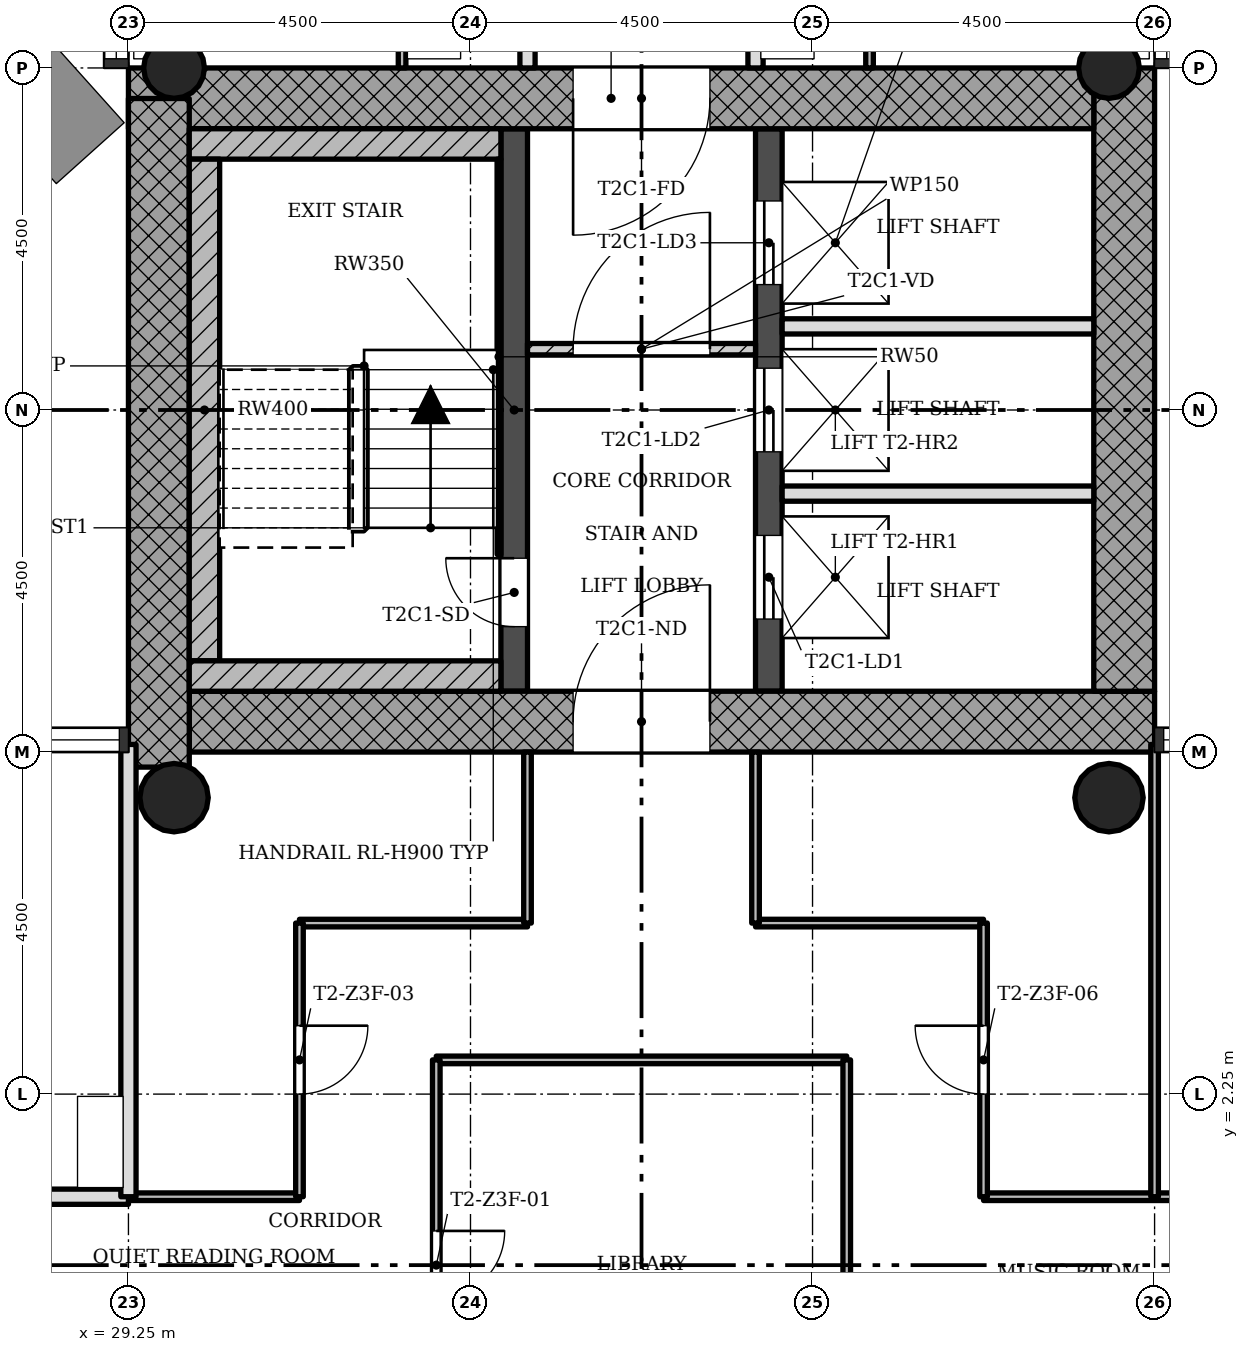
"""IFC4 building model, lengths in metres.
Left out: names, types, materials, properties, quantities, classifications, styles, units other than length and angle.
Written with IfcOpenShell. Run it as: python <this file> out.ifc"""

import sys

from ifc_helpers import new_model, si_unit, direction, frame, frame_2d, origin, origin_2d, place, context, subcontext, project, spatial, rectangle, hollow_circle, extrude, element, fill, save


model = new_model("IFC4")
c1 = context("Model", 3, precision=1e-05, world=origin(), true_north=direction((0.0, 1.0)))
c2 = subcontext(c1, "Body", "Model", "MODEL_VIEW")
j1 = project(units=[si_unit("LENGTHUNIT", "METRE"), si_unit("PLANEANGLEUNIT", "RADIAN")], contexts=[c1])
p1 = place(None, origin())
s1 = spatial("IfcSite", under=j1, at=p1, CompositionType="ELEMENT")
p2 = place(p1, origin())
s2 = spatial("IfcBuilding", under=s1, at=p2, CompositionType="ELEMENT")
p3 = place(p2, frame((0.0, 0.0, 164.3)))
s3 = spatial("IfcBuildingStorey", under=s2, at=p3, CompositionType="ELEMENT", Elevation=164.3)
p4 = place(p3, frame((30.05, 7.15, 0.0), z_axis=(0.0, 0.0, 1.0), x_axis=(1.0, 0.0, 0.0)))
e1 = element("IfcWall", 1, at=p4, inside=s3, PredefinedType="SHEAR", context=c2, shape_type="SweptSolid", body=[
    extrude(rectangle(XDim=12.7, YDim=0.8, at=frame_2d((6.35, 0.0))), origin(), (0.0, 0.0, 1.0), 3.4),
])
p5 = place(p4, frame((5.05, 0.0, 0.0)))
e2 = element("IfcOpeningElement", 2, at=p5, cuts=e1, PredefinedType="OPENING", context=c2, shape_type="SweptSolid", body=[
    extrude(rectangle(XDim=1.8, YDim=2.1, at=frame_2d((0.9, 1.05))), frame((0.0, 0.41, 0.0), z_axis=(0.0, -1.0, 0.0), x_axis=(1.0, 0.0, 0.0)), (0.0, 0.0, 1.0), 0.82),
])
p6 = place(p3, frame((42.35, 7.55, 0.0), z_axis=(0.0, 0.0, 1.0), x_axis=(0.0, 1.0, 0.0)))
e3 = element("IfcWall", 3, at=p6, inside=s3, PredefinedType="SHEAR", context=c2, shape_type="SweptSolid", body=[
    extrude(rectangle(XDim=8.2, YDim=0.8, at=frame_2d((4.1, 0.0))), origin(), (0.0, 0.0, 1.0), 3.4),
])
p7 = place(p3, frame((41.95, 15.35, 0.0), z_axis=(0.0, 0.0, 1.0), x_axis=(-1.0, 0.0, 0.0)))
e4 = element("IfcWall", 4, at=p7, inside=s3, PredefinedType="SHEAR", context=c2, shape_type="SweptSolid", body=[
    extrude(rectangle(XDim=12.7, YDim=0.8, at=frame_2d((6.35, 0.0))), origin(), (0.0, 0.0, 1.0), 3.4),
])
p8 = place(p7, frame((5.05, 0.0, 0.0)))
e5 = element("IfcOpeningElement", 5, at=p8, cuts=e4, PredefinedType="OPENING", context=c2, shape_type="SweptSolid", body=[
    extrude(rectangle(XDim=1.8, YDim=2.1, at=frame_2d((0.9, 1.05))), frame((0.0, 0.41, 0.0), z_axis=(0.0, -1.0, 0.0), x_axis=(1.0, 0.0, 0.0)), (0.0, 0.0, 1.0), 0.82),
])
p9 = place(p3, frame((29.65, 15.348, 0.0), z_axis=(0.0, 0.0, 1.0), x_axis=(0.0, -1.0, 0.0)))
e6 = element("IfcWall", 6, at=p9, inside=s3, PredefinedType="SHEAR", context=c2, shape_type="SweptSolid", body=[
    extrude(rectangle(XDim=8.796, YDim=0.8, at=frame_2d((4.398, 0.0))), origin(), (0.0, 0.0, 1.0), 3.4),
])
p10 = place(p3, frame((34.325, 7.55, 0.0), z_axis=(0.0, 0.0, 1.0), x_axis=(0.0, 1.0, 0.0)))
e7 = element("IfcWall", 7, at=p10, inside=s3, PredefinedType="SHEAR", context=c2, shape_type="SweptSolid", body=[
    extrude(rectangle(XDim=7.4, YDim=0.35, at=frame_2d((3.7, 0.0))), origin(), (0.0, 0.0, 1.0), 3.4),
])
p11 = place(p10, frame((0.85, 0.0, 0.0)))
e8 = element("IfcOpeningElement", 8, at=p11, cuts=e7, PredefinedType="OPENING", context=c2, shape_type="SweptSolid", body=[
    extrude(rectangle(XDim=0.9, YDim=2.1, at=frame_2d((0.45, 1.05))), frame((0.0, 0.185, 0.0), z_axis=(0.0, -1.0, 0.0), x_axis=(1.0, 0.0, 0.0)), (0.0, 0.0, 1.0), 0.37),
])
p12 = place(p3, frame((37.675, 7.55, 0.0), z_axis=(0.0, 0.0, 1.0), x_axis=(0.0, 1.0, 0.0)))
e9 = element("IfcWall", 9, at=p12, inside=s3, PredefinedType="SHEAR", context=c2, shape_type="SweptSolid", body=[
    extrude(rectangle(XDim=7.4, YDim=0.35, at=frame_2d((3.7, 0.0))), origin(), (0.0, 0.0, 1.0), 3.4),
])
p13 = place(p12, frame((0.95, 0.0, 0.0)))
e10 = element("IfcOpeningElement", 10, at=p13, cuts=e9, PredefinedType="OPENING", context=c2, shape_type="SweptSolid", body=[
    extrude(rectangle(XDim=1.1, YDim=2.1, at=frame_2d((0.55, 1.05))), frame((0.0, 0.185, 0.0), z_axis=(0.0, -1.0, 0.0), x_axis=(1.0, 0.0, 0.0)), (0.0, 0.0, 1.0), 0.37),
])
p14 = place(p12, frame((3.15, 0.0, 0.0)))
e11 = element("IfcOpeningElement", 11, at=p14, cuts=e9, PredefinedType="OPENING", context=c2, shape_type="SweptSolid", body=[
    extrude(rectangle(XDim=1.1, YDim=2.1, at=frame_2d((0.55, 1.05))), frame((0.0, 0.185, 0.0), z_axis=(0.0, -1.0, 0.0), x_axis=(1.0, 0.0, 0.0)), (0.0, 0.0, 1.0), 0.37),
])
p15 = place(p12, frame((5.35, 0.0, 0.0)))
e12 = element("IfcOpeningElement", 12, at=p15, cuts=e9, PredefinedType="OPENING", context=c2, shape_type="SweptSolid", body=[
    extrude(rectangle(XDim=1.1, YDim=2.1, at=frame_2d((0.55, 1.05))), frame((0.0, 0.185, 0.0), z_axis=(0.0, -1.0, 0.0), x_axis=(1.0, 0.0, 0.0)), (0.0, 0.0, 1.0), 0.37),
])
for number, where, z_axis, x_axis in (
    (13, (42.15, 15.75, 0.0), (0.0, 0.0, 1.0), (1.0, 0.0, 0.0)),
    (14, (29.85, 15.75, 0.0), (0.0, 0.0, 1.0), (1.0, 0.0, 0.0)),
):
    element("IfcColumn", number, at=place(p3, frame(where, z_axis=z_axis, x_axis=x_axis)), inside=s3, PredefinedType="COLUMN", context=c2, shape_type="SweptSolid", body=[
        extrude(hollow_circle(Radius=0.4, WallThickness=0.028, at=origin_2d()), origin(), (0.0, 0.0, 1.0), 3.4),
    ])
for number, where, z_axis, x_axis in (
    (15, (42.15, 6.15, 0.0), (0.0, 0.0, 1.0), (1.0, 0.0, 0.0)),
    (16, (29.85, 6.15, 0.0), (0.0, 0.0, 1.0), (1.0, 0.0, 0.0)),
):
    element("IfcColumn", number, at=place(p3, frame(where, z_axis=z_axis, x_axis=x_axis)), inside=s3, PredefinedType="COLUMN", context=c2, shape_type="SweptSolid", body=[
        extrude(hollow_circle(Radius=0.45, WallThickness=0.032, at=origin_2d()), origin(), (0.0, 0.0, 1.0), 3.4),
    ])
p16 = place(p3, frame((37.5, 12.05, 0.0), z_axis=(0.0, 0.0, 1.0), x_axis=(-1.0, 0.0, 0.0)))
e17 = element("IfcWall", 17, at=p16, inside=s3, PredefinedType="PARTITIONING", context=c2, shape_type="SweptSolid", body=[
    extrude(rectangle(XDim=3.0, YDim=0.15, at=frame_2d((1.5, 0.0))), origin(), (0.0, 0.0, 1.0), 3.0),
])
p17 = place(p16, frame((0.6, 0.0, 0.0)))
e18 = element("IfcOpeningElement", 18, at=p17, cuts=e17, PredefinedType="OPENING", context=c2, shape_type="SweptSolid", body=[
    extrude(rectangle(XDim=1.8, YDim=2.1, at=frame_2d((0.9, 1.05))), frame((0.0, 0.085, 0.0), z_axis=(0.0, -1.0, 0.0), x_axis=(1.0, 0.0, 0.0)), (0.0, 0.0, 1.0), 0.17),
])
for number, where, z_axis, x_axis in (
    (19, (41.95, 10.15, 0.0), (0.0, 0.0, 1.0), (-1.0, 0.0, 0.0)),
    (20, (41.95, 12.35, 0.0), (0.0, 0.0, 1.0), (-1.0, 0.0, 0.0)),
):
    element("IfcWall", number, at=place(p3, frame(where, z_axis=z_axis, x_axis=x_axis)), inside=s3, PredefinedType="SOLIDWALL", context=c2, shape_type="SweptSolid", body=[
        extrude(rectangle(XDim=4.1, YDim=0.2, at=frame_2d((2.05, 0.0))), origin(), (0.0, 0.0, 1.0), 3.0),
    ])
p18 = place(p3, frame((44.55, 0.9, 0.0), z_axis=(0.0, 0.0, 1.0), x_axis=(-1.0, 0.0, 0.0)))
e21 = element("IfcWall", 21, at=p18, inside=s3, PredefinedType="PARTITIONING", context=c2, shape_type="SweptSolid", body=[
    extrude(rectangle(XDim=4.05, YDim=0.1, at=frame_2d((2.025, 0.0))), origin(), (0.0, 0.0, 1.0), 3.0),
])
p19 = place(p3, frame((31.5, 0.9, 0.0), z_axis=(0.0, 0.0, 1.0), x_axis=(-1.0, 0.0, 0.0)))
e22 = element("IfcWall", 22, at=p19, inside=s3, PredefinedType="PARTITIONING", context=c2, shape_type="SweptSolid", body=[
    extrude(rectangle(XDim=2.25, YDim=0.1, at=frame_2d((1.125, 0.0))), origin(), (0.0, 0.0, 1.0), 3.0),
])
p20 = place(p3, frame((29.25, 0.9, 0.0), z_axis=(0.0, 0.0, 1.0), x_axis=(-1.0, 0.0, 0.0)))
e23 = element("IfcWall", 23, at=p20, inside=s3, PredefinedType="SOLIDWALL", context=c2, shape_type="SweptSolid", body=[
    extrude(rectangle(XDim=9.0, YDim=0.2, at=frame_2d((4.5, 0.0))), origin(), (0.0, 0.0, 1.0), 3.0),
])
p21 = place(p20, frame((6.15, 0.0, 0.0)))
e24 = element("IfcOpeningElement", 24, at=p21, cuts=e23, PredefinedType="OPENING", context=c2, shape_type="SweptSolid", body=[
    extrude(rectangle(XDim=0.9, YDim=2.1, at=frame_2d((0.45, 1.05))), frame((0.0, 0.11, 0.0), z_axis=(0.0, -1.0, 0.0), x_axis=(1.0, 0.0, 0.0)), (0.0, 0.0, 1.0), 0.22),
])
p22 = place(p3, frame((38.7, 2.7, 0.0), z_axis=(0.0, 0.0, 1.0), x_axis=(-1.0, 0.0, 0.0)))
e25 = element("IfcWall", 25, at=p22, inside=s3, PredefinedType="PARTITIONING", context=c2, shape_type="SweptSolid", body=[
    extrude(rectangle(XDim=5.4, YDim=0.1, at=frame_2d((2.7, 0.0))), origin(), (0.0, 0.0, 1.0), 3.0),
])
for number, where, z_axis, x_axis in (
    (26, (40.5, 4.5, 0.0), (0.0, 0.0, 1.0), (-1.0, 0.0, 0.0)),
    (27, (34.5, 4.5, 0.0), (0.0, 0.0, 1.0), (-1.0, 0.0, 0.0)),
):
    element("IfcWall", number, at=place(p3, frame(where, z_axis=z_axis, x_axis=x_axis)), inside=s3, PredefinedType="PARTITIONING", context=c2, shape_type="SweptSolid", body=[
        extrude(rectangle(XDim=3.0, YDim=0.1, at=frame_2d((1.5, 0.0))), origin(), (0.0, 0.0, 1.0), 3.0),
    ])
p23 = place(p3, frame((42.75, 0.9, 0.0), z_axis=(0.0, 0.0, 1.0), x_axis=(0.0, 1.0, 0.0)))
e28 = element("IfcWall", 28, at=p23, inside=s3, PredefinedType="PARTITIONING", context=c2, shape_type="SweptSolid", body=[
    extrude(rectangle(XDim=5.95, YDim=0.1, at=frame_2d((2.975, 0.0))), origin(), (0.0, 0.0, 1.0), 3.0),
])
p24 = place(p3, frame((40.5, 0.9, 0.0), z_axis=(0.0, 0.0, 1.0), x_axis=(0.0, 1.0, 0.0)))
e29 = element("IfcWall", 29, at=p24, inside=s3, PredefinedType="PARTITIONING", context=c2, shape_type="SweptSolid", body=[
    extrude(rectangle(XDim=3.6, YDim=0.1, at=frame_2d((1.8, 0.0))), origin(), (0.0, 0.0, 1.0), 3.0),
])
p25 = place(p24, frame((1.35, 0.0, 0.0)))
e30 = element("IfcOpeningElement", 30, at=p25, cuts=e29, PredefinedType="OPENING", context=c2, shape_type="SweptSolid", body=[
    extrude(rectangle(XDim=0.9, YDim=2.1, at=frame_2d((0.45, 1.05))), frame((0.0, 0.06, 0.0), z_axis=(0.0, -1.0, 0.0), x_axis=(1.0, 0.0, 0.0)), (0.0, 0.0, 1.0), 0.12),
])
p26 = place(p3, frame((39.0, 15.75, 0.0), z_axis=(0.0, 0.0, 1.0), x_axis=(0.0, 1.0, 0.0)))
e31 = element("IfcWall", 31, at=p26, inside=s3, PredefinedType="PARTITIONING", context=c2, shape_type="SweptSolid", body=[
    extrude(rectangle(XDim=2.4, YDim=0.1, at=frame_2d((1.2, 0.0))), origin(), (0.0, 0.0, 1.0), 3.0),
])
p27 = place(p26, frame((0.75, 0.0, 0.0)))
e32 = element("IfcOpeningElement", 32, at=p27, cuts=e31, PredefinedType="OPENING", context=c2, shape_type="SweptSolid", body=[
    extrude(rectangle(XDim=0.9, YDim=2.1, at=frame_2d((0.45, 1.05))), frame((0.0, 0.06, 0.0), z_axis=(0.0, -1.0, 0.0), x_axis=(1.0, 0.0, 0.0)), (0.0, 0.0, 1.0), 0.12),
])
p28 = place(p3, frame((38.7, -2.7, 0.0), z_axis=(0.0, 0.0, 1.0), x_axis=(0.0, 1.0, 0.0)))
e33 = element("IfcWall", 33, at=p28, inside=s3, PredefinedType="PARTITIONING", context=c2, shape_type="SweptSolid", body=[
    extrude(rectangle(XDim=5.4, YDim=0.1, at=frame_2d((2.7, 0.0))), origin(), (0.0, 0.0, 1.0), 3.0),
])
p29 = place(p3, frame((37.5, 4.5, 0.0), z_axis=(0.0, 0.0, 1.0), x_axis=(0.0, 1.0, 0.0)))
e34 = element("IfcWall", 34, at=p29, inside=s3, PredefinedType="PARTITIONING", context=c2, shape_type="SweptSolid", body=[
    extrude(rectangle(XDim=2.25, YDim=0.1, at=frame_2d((1.125, 0.0))), origin(), (0.0, 0.0, 1.0), 3.0),
])
p30 = place(p3, frame((37.5, 15.75, 0.0), z_axis=(0.0, 0.0, 1.0), x_axis=(0.0, 1.0, 0.0)))
e35 = element("IfcWall", 35, at=p30, inside=s3, PredefinedType="SOLIDWALL", context=c2, shape_type="SweptSolid", body=[
    extrude(rectangle(XDim=4.5, YDim=0.2, at=frame_2d((2.25, 0.0))), origin(), (0.0, 0.0, 1.0), 3.0),
])
p31 = place(p30, frame((3.0, 0.0, 0.0)))
e36 = element("IfcOpeningElement", 36, at=p31, cuts=e35, PredefinedType="OPENING", context=c2, shape_type="SweptSolid", body=[
    extrude(rectangle(XDim=0.9, YDim=2.1, at=frame_2d((0.45, 1.05))), frame((0.0, 0.11, 0.0), z_axis=(0.0, -1.0, 0.0), x_axis=(1.0, 0.0, 0.0)), (0.0, 0.0, 1.0), 0.22),
])
p32 = place(p3, frame((34.5, 4.5, 0.0), z_axis=(0.0, 0.0, 1.0), x_axis=(0.0, 1.0, 0.0)))
e37 = element("IfcWall", 37, at=p32, inside=s3, PredefinedType="PARTITIONING", context=c2, shape_type="SweptSolid", body=[
    extrude(rectangle(XDim=2.25, YDim=0.1, at=frame_2d((1.125, 0.0))), origin(), (0.0, 0.0, 1.0), 3.0),
])
p33 = place(p3, frame((34.5, 15.75, 0.0), z_axis=(0.0, 0.0, 1.0), x_axis=(0.0, 1.0, 0.0)))
e38 = element("IfcWall", 38, at=p33, inside=s3, PredefinedType="SOLIDWALL", context=c2, shape_type="SweptSolid", body=[
    extrude(rectangle(XDim=4.5, YDim=0.2, at=frame_2d((2.25, 0.0))), origin(), (0.0, 0.0, 1.0), 3.0),
])
p34 = place(p33, frame((3.0, 0.0, 0.0)))
e39 = element("IfcOpeningElement", 39, at=p34, cuts=e38, PredefinedType="OPENING", context=c2, shape_type="SweptSolid", body=[
    extrude(rectangle(XDim=0.9, YDim=2.1, at=frame_2d((0.45, 1.05))), frame((0.0, 0.11, 0.0), z_axis=(0.0, -1.0, 0.0), x_axis=(1.0, 0.0, 0.0)), (0.0, 0.0, 1.0), 0.22),
])
p35 = place(p3, frame((33.3, -2.7, 0.0), z_axis=(0.0, 0.0, 1.0), x_axis=(0.0, 1.0, 0.0)))
e40 = element("IfcWall", 40, at=p35, inside=s3, PredefinedType="PARTITIONING", context=c2, shape_type="SweptSolid", body=[
    extrude(rectangle(XDim=5.4, YDim=0.1, at=frame_2d((2.7, 0.0))), origin(), (0.0, 0.0, 1.0), 3.0),
])
p36 = place(p35, frame((2.25, 0.0, 0.0)))
e41 = element("IfcOpeningElement", 41, at=p36, cuts=e40, PredefinedType="OPENING", context=c2, shape_type="SweptSolid", body=[
    extrude(rectangle(XDim=0.9, YDim=2.1, at=frame_2d((0.45, 1.05))), frame((0.0, 0.06, 0.0), z_axis=(0.0, -1.0, 0.0), x_axis=(1.0, 0.0, 0.0)), (0.0, 0.0, 1.0), 0.12),
])
p37 = place(p3, frame((32.85, 15.75, 0.0), z_axis=(0.0, 0.0, 1.0), x_axis=(0.0, 1.0, 0.0)))
e42 = element("IfcWall", 42, at=p37, inside=s3, PredefinedType="PARTITIONING", context=c2, shape_type="SweptSolid", body=[
    extrude(rectangle(XDim=4.5, YDim=0.1, at=frame_2d((2.25, 0.0))), origin(), (0.0, 0.0, 1.0), 3.0),
])
p38 = place(p37, frame((3.0, 0.0, 0.0)))
e43 = element("IfcOpeningElement", 43, at=p38, cuts=e42, PredefinedType="OPENING", context=c2, shape_type="SweptSolid", body=[
    extrude(rectangle(XDim=0.9, YDim=2.1, at=frame_2d((0.45, 1.05))), frame((0.0, 0.06, 0.0), z_axis=(0.0, -1.0, 0.0), x_axis=(1.0, 0.0, 0.0)), (0.0, 0.0, 1.0), 0.12),
])
p39 = place(p3, frame((31.5, 0.9, 0.0), z_axis=(0.0, 0.0, 1.0), x_axis=(0.0, 1.0, 0.0)))
e44 = element("IfcWall", 44, at=p39, inside=s3, PredefinedType="PARTITIONING", context=c2, shape_type="SweptSolid", body=[
    extrude(rectangle(XDim=3.6, YDim=0.1, at=frame_2d((1.8, 0.0))), origin(), (0.0, 0.0, 1.0), 3.0),
])
p40 = place(p39, frame((1.35, 0.0, 0.0)))
e45 = element("IfcOpeningElement", 45, at=p40, cuts=e44, PredefinedType="OPENING", context=c2, shape_type="SweptSolid", body=[
    extrude(rectangle(XDim=0.9, YDim=2.1, at=frame_2d((0.45, 1.05))), frame((0.0, 0.06, 0.0), z_axis=(0.0, -1.0, 0.0), x_axis=(1.0, 0.0, 0.0)), (0.0, 0.0, 1.0), 0.12),
])
p41 = place(p3, frame((29.25, 0.9, 0.0), z_axis=(0.0, 0.0, 1.0), x_axis=(0.0, 1.0, 0.0)))
e46 = element("IfcWall", 46, at=p41, inside=s3, PredefinedType="SOLIDWALL", context=c2, shape_type="SweptSolid", body=[
    extrude(rectangle(XDim=5.95, YDim=0.2, at=frame_2d((2.975, 0.0))), origin(), (0.0, 0.0, 1.0), 3.0),
])
p42 = place(p3, frame((34.15, 14.75, 0.0), z_axis=(0.0, 0.0, 1.0), x_axis=(-1.0, 0.0, 0.0)))
e47 = element("IfcWall", 47, at=p42, inside=s3, PredefinedType="SHEAR", context=c2, shape_type="SweptSolid", body=[
    extrude(rectangle(XDim=4.1, YDim=0.4, at=frame_2d((2.05, 0.0))), origin(), (0.0, 0.0, 1.0), 3.4),
])
p43 = place(p3, frame((30.25, 7.95, 0.0), z_axis=(0.0, 0.0, 1.0), x_axis=(0.0, 1.0, 0.0)))
e48 = element("IfcWall", 48, at=p43, inside=s3, PredefinedType="SHEAR", context=c2, shape_type="SweptSolid", body=[
    extrude(rectangle(XDim=6.6, YDim=0.4, at=frame_2d((3.3, 0.0))), origin(), (0.0, 0.0, 1.0), 3.4),
])
p44 = place(p3, frame((34.15, 7.75, 0.0), z_axis=(0.0, 0.0, 1.0), x_axis=(-1.0, 0.0, 0.0)))
e49 = element("IfcWall", 49, at=p44, inside=s3, PredefinedType="SHEAR", context=c2, shape_type="SweptSolid", body=[
    extrude(rectangle(XDim=4.1, YDim=0.4, at=frame_2d((2.05, 0.0))), origin(), (0.0, 0.0, 1.0), 3.4),
])
p45 = place(p3, frame((34.125, 9.35, 0.0), z_axis=(0.0, 0.0, 1.0), x_axis=(0.0, 1.0, 0.0)))
e50 = element("IfcWall", 50, at=p45, inside=s3, PredefinedType="SHEAR", context=c2, shape_type="SweptSolid", body=[
    extrude(rectangle(XDim=5.2, YDim=0.05, at=frame_2d((2.6, 0.0))), origin(), (0.0, 0.0, 1.0), 3.4),
])
p46 = place(p17, origin())
e51 = element("IfcDoor", 51, at=p46, inside=s3, OperationType="SINGLE_SWING_LEFT", PredefinedType="DOOR", context=c2, shape_type="SweptSolid", body=[
    extrude(rectangle(XDim=1.8, YDim=2.1, at=frame_2d((0.9, 1.05))), frame((0.0, 0.025, 0.0), z_axis=(0.0, -1.0, 0.0), x_axis=(1.0, 0.0, 0.0)), (0.0, 0.0, 1.0), 0.05),
])
fill(e18, e51)
p47 = place(p36, origin())
e52 = element("IfcDoor", 52, at=p47, inside=s3, OperationType="SINGLE_SWING_RIGHT", PredefinedType="DOOR", context=c2, shape_type="SweptSolid", body=[
    extrude(rectangle(XDim=0.9, YDim=2.1, at=frame_2d((0.45, 1.05))), frame((0.0, 0.025, 0.0), z_axis=(0.0, -1.0, 0.0), x_axis=(1.0, 0.0, 0.0)), (0.0, 0.0, 1.0), 0.05),
])
fill(e41, e52)
p48 = place(p40, origin())
e53 = element("IfcDoor", 53, at=p48, inside=s3, OperationType="SINGLE_SWING_RIGHT", PredefinedType="DOOR", context=c2, shape_type="SweptSolid", body=[
    extrude(rectangle(XDim=0.9, YDim=2.1, at=frame_2d((0.45, 1.05))), frame((0.0, 0.025, 0.0), z_axis=(0.0, -1.0, 0.0), x_axis=(1.0, 0.0, 0.0)), (0.0, 0.0, 1.0), 0.05),
])
fill(e45, e53)
p49 = place(p25, origin())
e54 = element("IfcDoor", 54, at=p49, inside=s3, OperationType="SINGLE_SWING_LEFT", PredefinedType="DOOR", context=c2, shape_type="SweptSolid", body=[
    extrude(rectangle(XDim=0.9, YDim=2.1, at=frame_2d((0.45, 1.05))), frame((0.0, 0.025, 0.0), z_axis=(0.0, -1.0, 0.0), x_axis=(1.0, 0.0, 0.0)), (0.0, 0.0, 1.0), 0.05),
])
fill(e30, e54)
p50 = place(p11, origin())
e55 = element("IfcDoor", 55, at=p50, inside=s3, OperationType="SINGLE_SWING_LEFT", PredefinedType="DOOR", context=c2, shape_type="SweptSolid", body=[
    extrude(rectangle(XDim=0.9, YDim=2.1, at=frame_2d((0.45, 1.05))), frame((0.0, 0.025, 0.0), z_axis=(0.0, -1.0, 0.0), x_axis=(1.0, 0.0, 0.0)), (0.0, 0.0, 1.0), 0.05),
])
fill(e8, e55)
p51 = place(p13, origin())
e56 = element("IfcDoor", 56, at=p51, inside=s3, OperationType="SLIDING_TO_LEFT", PredefinedType="DOOR", context=c2, shape_type="SweptSolid", body=[
    extrude(rectangle(XDim=1.1, YDim=2.1, at=frame_2d((0.55, 1.05))), frame((0.0, 0.025, 0.0), z_axis=(0.0, -1.0, 0.0), x_axis=(1.0, 0.0, 0.0)), (0.0, 0.0, 1.0), 0.05),
])
fill(e10, e56)
p52 = place(p14, origin())
e57 = element("IfcDoor", 57, at=p52, inside=s3, OperationType="SLIDING_TO_LEFT", PredefinedType="DOOR", context=c2, shape_type="SweptSolid", body=[
    extrude(rectangle(XDim=1.1, YDim=2.1, at=frame_2d((0.55, 1.05))), frame((0.0, 0.025, 0.0), z_axis=(0.0, -1.0, 0.0), x_axis=(1.0, 0.0, 0.0)), (0.0, 0.0, 1.0), 0.05),
])
fill(e11, e57)
p53 = place(p15, origin())
e58 = element("IfcDoor", 58, at=p53, inside=s3, OperationType="SLIDING_TO_LEFT", PredefinedType="DOOR", context=c2, shape_type="SweptSolid", body=[
    extrude(rectangle(XDim=1.1, YDim=2.1, at=frame_2d((0.55, 1.05))), frame((0.0, 0.025, 0.0), z_axis=(0.0, -1.0, 0.0), x_axis=(1.0, 0.0, 0.0)), (0.0, 0.0, 1.0), 0.05),
])
fill(e12, e58)
p54 = place(p5, origin())
e59 = element("IfcDoor", 59, at=p54, inside=s3, OperationType="SINGLE_SWING_LEFT", PredefinedType="DOOR", context=c2, shape_type="SweptSolid", body=[
    extrude(rectangle(XDim=1.8, YDim=2.1, at=frame_2d((0.9, 1.05))), frame((0.0, 0.025, 0.0), z_axis=(0.0, -1.0, 0.0), x_axis=(1.0, 0.0, 0.0)), (0.0, 0.0, 1.0), 0.05),
])
fill(e2, e59)
p55 = place(p8, origin())
e60 = element("IfcDoor", 60, at=p55, inside=s3, OperationType="SINGLE_SWING_LEFT", PredefinedType="DOOR", context=c2, shape_type="SweptSolid", body=[
    extrude(rectangle(XDim=1.8, YDim=2.1, at=frame_2d((0.9, 1.05))), frame((0.0, 0.025, 0.0), z_axis=(0.0, -1.0, 0.0), x_axis=(1.0, 0.0, 0.0)), (0.0, 0.0, 1.0), 0.05),
])
fill(e5, e60)
save(model, sys.argv[1])
